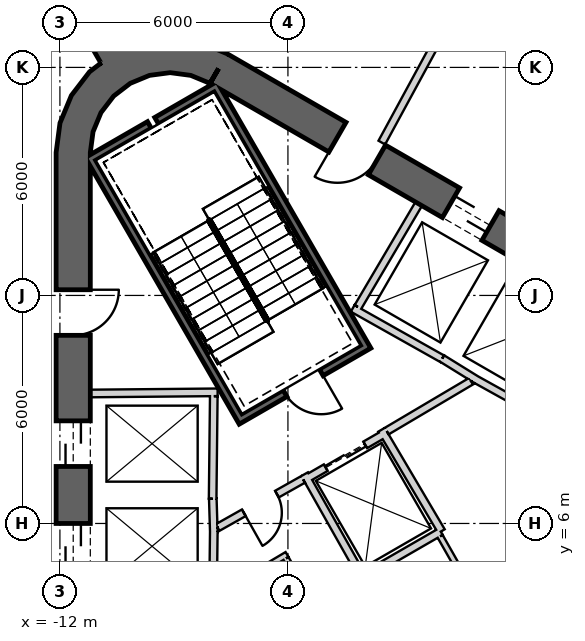
"""IFC4 building model, lengths in metres.
Left out: names, types, materials, properties, quantities, classifications, styles, units other than length and angle.
Written with IfcOpenShell. Run it as: python <this file> out.ifc"""

import sys

from ifc_helpers import new_model, si_unit, direction, frame, frame_2d, origin, place, context, subcontext, project, spatial, polyline, rectangle, outline, extrude, element, fill, save


model = new_model("IFC4")
c1 = context("Model", 3, precision=1e-05, world=origin(), true_north=direction((0.0, 1.0)))
c2 = subcontext(c1, "Body", "Model", "MODEL_VIEW")
j1 = project(units=[si_unit("LENGTHUNIT", "METRE"), si_unit("PLANEANGLEUNIT", "RADIAN")], contexts=[c1])
p1 = place(None, origin())
s1 = spatial("IfcSite", under=j1, at=p1, CompositionType="ELEMENT")
p2 = place(p1, origin())
s2 = spatial("IfcBuilding", under=s1, at=p2, CompositionType="ELEMENT")
p3 = place(p2, frame((0.0, 0.0, 156.2)))
s3 = spatial("IfcBuildingStorey", under=s2, at=p3, CompositionType="ELEMENT", Elevation=156.2)
p4 = place(p3, frame((19.475, 2.208, 0.0), z_axis=(0.0, 0.0, 1.0), x_axis=(-0.866028369851, 0.499994862586, 0.0)))
e1 = element("IfcWall", 1, at=p4, inside=s3, PredefinedType="SHEAR", context=c2, shape_type="SweptSolid", body=[
    extrude(rectangle(XDim=31.523, YDim=0.9, at=frame_2d((15.762, 0.0))), origin(), (0.0, 0.0, 1.0), 7.0),
])
p5 = place(p4, frame((7.062, 0.0, 0.0)))
e2 = element("IfcOpeningElement", 2, at=p5, cuts=e1, PredefinedType="OPENING", context=c2, shape_type="SweptSolid", body=[
    extrude(rectangle(XDim=1.2, YDim=2.4, at=frame_2d((0.6, 1.2))), frame((0.0, 0.46, 0.0), z_axis=(0.0, -1.0, 0.0), x_axis=(1.0, 0.0, 0.0)), (0.0, 0.0, 1.0), 0.92),
])
p6 = place(p4, frame((15.162, 0.0, 0.0)))
e3 = element("IfcOpeningElement", 3, at=p6, cuts=e1, PredefinedType="OPENING", context=c2, shape_type="SweptSolid", body=[
    extrude(rectangle(XDim=1.2, YDim=2.4, at=frame_2d((0.6, 1.2))), frame((0.0, 0.46, 0.0), z_axis=(0.0, -1.0, 0.0), x_axis=(1.0, 0.0, 0.0)), (0.0, 0.0, 1.0), 0.92),
])
p7 = place(p4, frame((17.862, 0.0, 0.0)))
e4 = element("IfcOpeningElement", 4, at=p7, cuts=e1, PredefinedType="OPENING", context=c2, shape_type="SweptSolid", body=[
    extrude(rectangle(XDim=1.2, YDim=2.4, at=frame_2d((0.6, 1.2))), frame((0.0, 0.46, 0.0), z_axis=(0.0, -1.0, 0.0), x_axis=(1.0, 0.0, 0.0)), (0.0, 0.0, 1.0), 0.92),
])
p8 = place(p4, frame((20.562, 0.0, 0.0)))
e5 = element("IfcOpeningElement", 5, at=p8, cuts=e1, PredefinedType="OPENING", context=c2, shape_type="SweptSolid", body=[
    extrude(rectangle(XDim=1.2, YDim=2.4, at=frame_2d((0.6, 1.2))), frame((0.0, 0.46, 0.0), z_axis=(0.0, -1.0, 0.0), x_axis=(1.0, 0.0, 0.0)), (0.0, 0.0, 1.0), 0.92),
])
p9 = place(p4, frame((23.262, 0.0, 0.0)))
e6 = element("IfcOpeningElement", 6, at=p9, cuts=e1, PredefinedType="OPENING", context=c2, shape_type="SweptSolid", body=[
    extrude(rectangle(XDim=1.2, YDim=2.4, at=frame_2d((0.6, 1.2))), frame((0.0, 0.46, 0.0), z_axis=(0.0, -1.0, 0.0), x_axis=(1.0, 0.0, 0.0)), (0.0, 0.0, 1.0), 0.92),
])
p10 = place(p4, frame((3.612, 0.0, 0.0)))
e7 = element("IfcOpeningElement", 7, at=p10, cuts=e1, PredefinedType="OPENING", context=c2, shape_type="SweptSolid", body=[
    extrude(rectangle(XDim=1.2, YDim=2.4, at=frame_2d((0.6, 1.2))), frame((0.0, 0.46, 0.0), z_axis=(0.0, -1.0, 0.0), x_axis=(1.0, 0.0, 0.0)), (0.0, 0.0, 1.0), 0.92),
])
p11 = place(p4, frame((26.712, 0.0, 0.0)))
e8 = element("IfcOpeningElement", 8, at=p11, cuts=e1, PredefinedType="OPENING", context=c2, shape_type="SweptSolid", body=[
    extrude(rectangle(XDim=1.2, YDim=2.4, at=frame_2d((0.6, 1.2))), frame((0.0, 0.46, 0.0), z_axis=(0.0, -1.0, 0.0), x_axis=(1.0, 0.0, 0.0)), (0.0, 0.0, 1.0), 0.92),
])
p12 = place(p3, frame((-11.65, 15.762, 0.0), z_axis=(0.0, 0.0, 1.0), x_axis=(0.0, -1.0, 0.0)))
e9 = element("IfcWall", 9, at=p12, inside=s3, PredefinedType="SHEAR", context=c2, shape_type="SweptSolid", body=[
    extrude(rectangle(XDim=31.523, YDim=0.9, at=frame_2d((15.762, 0.0))), origin(), (0.0, 0.0, 1.0), 7.0),
])
p13 = place(p12, frame((7.062, 0.0, 0.0)))
e10 = element("IfcOpeningElement", 10, at=p13, cuts=e9, PredefinedType="OPENING", context=c2, shape_type="SweptSolid", body=[
    extrude(rectangle(XDim=1.2, YDim=2.4, at=frame_2d((0.6, 1.2))), frame((0.0, 0.46, 0.0), z_axis=(0.0, -1.0, 0.0), x_axis=(1.0, 0.0, 0.0)), (0.0, 0.0, 1.0), 0.92),
])
p14 = place(p12, frame((9.762, 0.0, 0.0)))
e11 = element("IfcOpeningElement", 11, at=p14, cuts=e9, PredefinedType="OPENING", context=c2, shape_type="SweptSolid", body=[
    extrude(rectangle(XDim=1.2, YDim=2.4, at=frame_2d((0.6, 1.2))), frame((0.0, 0.46, 0.0), z_axis=(0.0, -1.0, 0.0), x_axis=(1.0, 0.0, 0.0)), (0.0, 0.0, 1.0), 0.92),
])
p15 = place(p12, frame((12.462, 0.0, 0.0)))
e12 = element("IfcOpeningElement", 12, at=p15, cuts=e9, PredefinedType="OPENING", context=c2, shape_type="SweptSolid", body=[
    extrude(rectangle(XDim=1.2, YDim=2.4, at=frame_2d((0.6, 1.2))), frame((0.0, 0.46, 0.0), z_axis=(0.0, -1.0, 0.0), x_axis=(1.0, 0.0, 0.0)), (0.0, 0.0, 1.0), 0.92),
])
p16 = place(p12, frame((15.162, 0.0, 0.0)))
e13 = element("IfcOpeningElement", 13, at=p16, cuts=e9, PredefinedType="OPENING", context=c2, shape_type="SweptSolid", body=[
    extrude(rectangle(XDim=1.2, YDim=2.4, at=frame_2d((0.6, 1.2))), frame((0.0, 0.46, 0.0), z_axis=(0.0, -1.0, 0.0), x_axis=(1.0, 0.0, 0.0)), (0.0, 0.0, 1.0), 0.92),
])
p17 = place(p12, frame((17.862, 0.0, 0.0)))
e14 = element("IfcOpeningElement", 14, at=p17, cuts=e9, PredefinedType="OPENING", context=c2, shape_type="SweptSolid", body=[
    extrude(rectangle(XDim=1.2, YDim=2.4, at=frame_2d((0.6, 1.2))), frame((0.0, 0.46, 0.0), z_axis=(0.0, -1.0, 0.0), x_axis=(1.0, 0.0, 0.0)), (0.0, 0.0, 1.0), 0.92),
])
p18 = place(p12, frame((20.562, 0.0, 0.0)))
e15 = element("IfcOpeningElement", 15, at=p18, cuts=e9, PredefinedType="OPENING", context=c2, shape_type="SweptSolid", body=[
    extrude(rectangle(XDim=1.2, YDim=2.4, at=frame_2d((0.6, 1.2))), frame((0.0, 0.46, 0.0), z_axis=(0.0, -1.0, 0.0), x_axis=(1.0, 0.0, 0.0)), (0.0, 0.0, 1.0), 0.92),
])
p19 = place(p12, frame((23.262, 0.0, 0.0)))
e16 = element("IfcOpeningElement", 16, at=p19, cuts=e9, PredefinedType="OPENING", context=c2, shape_type="SweptSolid", body=[
    extrude(rectangle(XDim=1.2, YDim=2.4, at=frame_2d((0.6, 1.2))), frame((0.0, 0.46, 0.0), z_axis=(0.0, -1.0, 0.0), x_axis=(1.0, 0.0, 0.0)), (0.0, 0.0, 1.0), 0.92),
])
p20 = place(p12, frame((3.612, 0.0, 0.0)))
e17 = element("IfcOpeningElement", 17, at=p20, cuts=e9, PredefinedType="OPENING", context=c2, shape_type="SweptSolid", body=[
    extrude(rectangle(XDim=1.2, YDim=2.4, at=frame_2d((0.6, 1.2))), frame((0.0, 0.46, 0.0), z_axis=(0.0, -1.0, 0.0), x_axis=(1.0, 0.0, 0.0)), (0.0, 0.0, 1.0), 0.92),
])
p21 = place(p12, frame((26.712, 0.0, 0.0)))
e18 = element("IfcOpeningElement", 18, at=p21, cuts=e9, PredefinedType="OPENING", context=c2, shape_type="SweptSolid", body=[
    extrude(rectangle(XDim=1.2, YDim=2.4, at=frame_2d((0.6, 1.2))), frame((0.0, 0.46, 0.0), z_axis=(0.0, -1.0, 0.0), x_axis=(1.0, 0.0, 0.0)), (0.0, 0.0, 1.0), 0.92),
])
p22 = place(p3, origin())
e19 = element("IfcWall", 19, at=p22, inside=s3, PredefinedType="SHEAR", context=c2, shape_type="SweptSolid", body=[
    extrude(outline(polyline([(-7.6, 18.36), (-8.323, 18.659), (-9.1, 18.762), (-9.876, 18.659), (-10.6, 18.36), (-11.221, 17.883), (-11.698, 17.262), (-11.998, 16.538), (-12.1, 15.762), (-11.2, 15.762), (-11.128, 16.305), (-10.919, 16.812), (-10.585, 17.247), (-10.15, 17.58), (-9.644, 17.79), (-9.1, 17.862), (-8.556, 17.79), (-8.05, 17.58), (-7.6, 18.36)])), origin(), (0.0, 0.0, 1.0), 7.0),
])
p23 = place(p3, frame((-10.575, 18.316, 0.0), z_axis=(0.0, 0.0, 1.0), x_axis=(-0.500002326941, 0.86602406032, 0.0)))
e20 = element("IfcWall", 20, at=p23, inside=s3, PredefinedType="SHEAR", context=c2, shape_type="SweptSolid", body=[
    extrude(rectangle(XDim=12.384, YDim=0.8, at=frame_2d((6.192, 0.0))), origin(), (0.0, 0.0, 1.0), 7.0),
])
p24 = place(p23, frame((2.05, 0.0, 0.0)))
e21 = element("IfcOpeningElement", 21, at=p24, cuts=e20, PredefinedType="OPENING", context=c2, shape_type="SweptSolid", body=[
    extrude(rectangle(XDim=1.4, YDim=2.4, at=frame_2d((0.7, 1.2))), frame((0.0, 0.41, 0.0), z_axis=(0.0, -1.0, 0.0), x_axis=(1.0, 0.0, 0.0)), (0.0, 0.0, 1.0), 0.82),
])
p25 = place(p3, frame((-11.2, 9.42, 0.0), z_axis=(0.0, 0.0, 1.0), x_axis=(0.999957167047, 0.009255488683, 0.0)))
e22 = element("IfcWall", 22, at=p25, inside=s3, PredefinedType="PLUMBINGWALL", context=c2, shape_type="SweptSolid", body=[
    extrude(rectangle(XDim=3.35, YDim=0.2, at=frame_2d((1.675, 0.0))), origin(), (0.0, 0.0, 1.0), 6.65),
])
p26 = place(p3, frame((-7.951, 9.35, 0.0), z_axis=(0.0, 0.0, 1.0), x_axis=(-0.011120469654, -0.999938165666, 0.0)))
e23 = element("IfcWall", 23, at=p26, inside=s3, PredefinedType="PLUMBINGWALL", context=c2, shape_type="SweptSolid", body=[
    extrude(rectangle(XDim=2.7, YDim=0.2, at=frame_2d((1.35, 0.0))), origin(), (0.0, 0.0, 1.0), 6.65),
])
p27 = place(p3, frame((-7.977, 6.65, 0.0), z_axis=(0.0, 0.0, 1.0), x_axis=(0.030861509705, -0.999523670164, 0.0)))
e24 = element("IfcWall", 24, at=p27, inside=s3, PredefinedType="PLUMBINGWALL", context=c2, shape_type="SweptSolid", body=[
    extrude(rectangle(XDim=0.878, YDim=0.2, at=frame_2d((0.439, 0.0))), origin(), (0.0, 0.0, 1.0), 6.65),
])
p28 = place(p3, frame((-7.949, 5.895, 0.0), z_axis=(0.0, 0.0, 1.0), x_axis=(-0.012042535896, -0.999927486035, 0.0)))
e25 = element("IfcWall", 25, at=p28, inside=s3, PredefinedType="PLUMBINGWALL", context=c2, shape_type="SweptSolid", body=[
    extrude(rectangle(XDim=1.845, YDim=0.2, at=frame_2d((0.922, 0.0))), origin(), (0.0, 0.0, 1.0), 6.65),
])
p29 = place(p3, frame((-1.941, 10.339, 0.0), z_axis=(0.0, 0.0, 1.0), x_axis=(0.850216889117, -0.526432561171, 0.0)))
e26 = element("IfcWall", 26, at=p29, inside=s3, PredefinedType="PLUMBINGWALL", context=c2, shape_type="SweptSolid", body=[
    extrude(rectangle(XDim=1.078, YDim=0.2, at=frame_2d((0.539, 0.0))), origin(), (0.0, 0.0, 1.0), 6.65),
])
p30 = place(p3, frame((0.483, 8.936, 0.0), z_axis=(0.0, 0.0, 1.0), x_axis=(-0.874269620932, 0.485440655401, 0.0)))
e27 = element("IfcWall", 27, at=p30, inside=s3, PredefinedType="PLUMBINGWALL", context=c2, shape_type="SweptSolid", body=[
    extrude(rectangle(XDim=1.845, YDim=0.2, at=frame_2d((0.922, 0.0))), origin(), (0.0, 0.0, 1.0), 6.65),
])
p31 = place(p3, frame((-4.296, 11.659, 0.0), z_axis=(0.0, 0.0, 1.0), x_axis=(0.871534483978, -0.490334215854, 0.0)))
e28 = element("IfcWall", 28, at=p31, inside=s3, PredefinedType="PLUMBINGWALL", context=c2, shape_type="SweptSolid", body=[
    extrude(rectangle(XDim=2.7, YDim=0.2, at=frame_2d((1.35, 0.0))), origin(), (0.0, 0.0, 1.0), 6.65),
])
p32 = place(p3, frame((-4.158, 11.696, 0.0), z_axis=(0.0, 0.0, 1.0), x_axis=(0.508018930956, 0.861345903683, 0.0)))
e29 = element("IfcWall", 29, at=p32, inside=s3, PredefinedType="PLUMBINGWALL", context=c2, shape_type="SweptSolid", body=[
    extrude(rectangle(XDim=3.15, YDim=0.2, at=frame_2d((1.575, 0.0))), origin(), (0.0, 0.0, 1.0), 6.65),
])
p33 = place(p3, frame((-11.245, 15.678, -0.35), z_axis=(0.0, 0.0, 1.0), x_axis=(0.499977274689, -0.866038523851, 0.0)))
e30 = element("IfcWall", 30, at=p33, inside=s3, PredefinedType="SHEAR", context=c2, shape_type="SweptSolid", body=[
    extrude(rectangle(XDim=8.1, YDim=0.2, at=frame_2d((4.05, 0.0))), origin(), (0.0, 0.0, 1.0), 7.0),
])
p34 = place(p3, frame((-7.818, 17.541, -0.35), z_axis=(0.0, 0.0, 1.0), x_axis=(-0.866088799389, -0.499890179513, 0.0)))
e31 = element("IfcWall", 31, at=p34, inside=s3, PredefinedType="SHEAR", context=c2, shape_type="SweptSolid", body=[
    extrude(rectangle(XDim=1.89, YDim=0.2, at=frame_2d((0.945, 0.0))), origin(), (0.0, 0.0, 1.0), 7.0),
])
p35 = place(p3, frame((-9.645, 16.486, -0.35), z_axis=(0.0, 0.0, 1.0), x_axis=(-0.866038843867, -0.499976720371, 0.0)))
e32 = element("IfcWall", 32, at=p35, inside=s3, PredefinedType="SHEAR", context=c2, shape_type="SweptSolid", body=[
    extrude(rectangle(XDim=1.69, YDim=0.2, at=frame_2d((0.845, 0.0))), origin(), (0.0, 0.0, 1.0), 7.0),
])
p36 = place(p3, frame((-7.854, 17.405, -0.35), z_axis=(0.0, 0.0, 1.0), x_axis=(0.499997992926, -0.866026562566, 0.0)))
e33 = element("IfcWall", 33, at=p36, inside=s3, PredefinedType="SHEAR", context=c2, shape_type="SweptSolid", body=[
    extrude(rectangle(XDim=7.9, YDim=0.2, at=frame_2d((3.95, 0.0))), origin(), (0.0, 0.0, 1.0), 7.0),
])
p37 = place(p3, frame((-7.159, 8.8, -0.35), z_axis=(0.0, 0.0, 1.0), x_axis=(0.866047807691, 0.499961193289, 0.0)))
e34 = element("IfcWall", 34, at=p37, inside=s3, PredefinedType="SHEAR", context=c2, shape_type="SweptSolid", body=[
    extrude(rectangle(XDim=3.6, YDim=0.2, at=frame_2d((1.8, 0.0))), origin(), (0.0, 0.0, 1.0), 7.0),
])
p38 = place(p37, frame((1.25, 0.0, 0.35)))
e35 = element("IfcOpeningElement", 35, at=p38, cuts=e34, PredefinedType="OPENING", context=c2, shape_type="SweptSolid", body=[
    extrude(rectangle(XDim=1.1, YDim=2.1, at=frame_2d((0.55, 1.05))), frame((0.0, 0.11, 0.0), z_axis=(0.0, -1.0, 0.0), x_axis=(1.0, 0.0, 0.0)), (0.0, 0.0, 1.0), 0.22),
])
p39 = place(p3, frame((-5.524, 7.168, 0.0), z_axis=(0.0, 0.0, 1.0), x_axis=(0.866024647952, 0.500001309137, 0.0)))
e36 = element("IfcWall", 36, at=p39, inside=s3, PredefinedType="PLUMBINGWALL", context=c2, shape_type="SweptSolid", body=[
    extrude(rectangle(XDim=2.4, YDim=0.2, at=frame_2d((1.2, 0.0))), origin(), (0.0, 0.0, 1.0), 6.65),
])
p40 = place(p39, frame((0.6, 0.0, 0.0)))
e37 = element("IfcOpeningElement", 37, at=p40, cuts=e36, PredefinedType="OPENING", context=c2, shape_type="SweptSolid", body=[
    extrude(rectangle(XDim=1.2, YDim=2.4, at=frame_2d((0.6, 1.2))), frame((0.0, 0.11, 0.0), z_axis=(0.0, -1.0, 0.0), x_axis=(1.0, 0.0, 0.0)), (0.0, 0.0, 1.0), 0.22),
])
p41 = place(p3, frame((-3.538, 8.465, 0.0), z_axis=(0.0, 0.0, 1.0), x_axis=(0.508647062354, -0.860975125052, 0.0)))
e38 = element("IfcWall", 38, at=p41, inside=s3, PredefinedType="PLUMBINGWALL", context=c2, shape_type="SweptSolid", body=[
    extrude(rectangle(XDim=3.1, YDim=0.2, at=frame_2d((1.55, 0.0))), origin(), (0.0, 0.0, 1.0), 6.65),
])
p42 = place(p3, frame((-1.979, 5.786, 0.0), z_axis=(0.0, 0.0, 1.0), x_axis=(-0.866016689309, -0.500015093611, 0.0)))
e39 = element("IfcWall", 39, at=p42, inside=s3, PredefinedType="PLUMBINGWALL", context=c2, shape_type="SweptSolid", body=[
    extrude(rectangle(XDim=2.479, YDim=0.2, at=frame_2d((1.24, 0.0))), origin(), (0.0, 0.0, 1.0), 6.65),
])
p43 = place(p3, frame((-5.562, 7.296, 0.0), z_axis=(0.0, 0.0, 1.0), x_axis=(0.49134651263, -0.870964180966, 0.0)))
e40 = element("IfcWall", 40, at=p43, inside=s3, PredefinedType="PLUMBINGWALL", context=c2, shape_type="SweptSolid", body=[
    extrude(rectangle(XDim=3.0, YDim=0.2, at=frame_2d((1.5, 0.0))), origin(), (0.0, 0.0, 1.0), 6.65),
])
p44 = place(p3, frame((-1.18, 9.744, 0.0), z_axis=(0.0, 0.0, 1.0), x_axis=(-0.860615607571, -0.509255118781, 0.0)))
e41 = element("IfcWall", 41, at=p44, inside=s3, PredefinedType="PARTITIONING", context=c2, shape_type="SweptSolid", body=[
    extrude(rectangle(XDim=2.581, YDim=0.2, at=frame_2d((1.29, 0.0))), origin(), (0.0, 0.0, 1.0), 6.65),
])
p45 = place(p3, frame((-5.6, 7.16, 0.0), z_axis=(0.0, 0.0, 1.0), x_axis=(-0.871363259478, -0.490638431059, 0.0)))
e42 = element("IfcWall", 42, at=p45, inside=s3, PredefinedType="PARTITIONING", context=c2, shape_type="SweptSolid", body=[
    extrude(rectangle(XDim=2.581, YDim=0.2, at=frame_2d((1.291, 0.0))), origin(), (0.0, 0.0, 1.0), 6.65),
])
p46 = place(p45, frame((0.791, 0.0, 0.0)))
e43 = element("IfcOpeningElement", 43, at=p46, cuts=e42, PredefinedType="OPENING", context=c2, shape_type="SweptSolid", body=[
    extrude(rectangle(XDim=1.0, YDim=2.1, at=frame_2d((0.5, 1.05))), frame((0.0, 0.11, 0.0), z_axis=(0.0, -1.0, 0.0), x_axis=(1.0, 0.0, 0.0)), (0.0, 0.0, 1.0), 0.22),
])
p47 = place(p3, frame((-1.994, 5.661, 0.0), z_axis=(0.0, 0.0, 1.0), x_axis=(0.494341211302, -0.869267948798, 0.0)))
e44 = element("IfcWall", 44, at=p47, inside=s3, PredefinedType="PLUMBINGWALL", context=c2, shape_type="SweptSolid", body=[
    extrude(rectangle(XDim=4.361, YDim=0.15, at=frame_2d((2.18, 0.0))), origin(), (0.0, 0.0, 1.0), 6.65),
])
p48 = place(p3, frame((-6.024, 5.183, 0.0), z_axis=(0.0, 0.0, 1.0), x_axis=(-0.860126804455, -0.510080268447, 0.0)))
e45 = element("IfcWall", 45, at=p48, inside=s3, PredefinedType="PLUMBINGWALL", context=c2, shape_type="SweptSolid", body=[
    extrude(rectangle(XDim=2.24, YDim=0.15, at=frame_2d((1.12, 0.0))), origin(), (0.0, 0.0, 1.0), 6.65),
])
p49 = place(p3, frame((-4.551, 2.482, 0.0), z_axis=(0.0, 0.0, 1.0), x_axis=(-0.499990139034, 0.866031096941, 0.0)))
e46 = element("IfcWall", 46, at=p49, inside=s3, PredefinedType="PLUMBINGWALL", context=c2, shape_type="SweptSolid", body=[
    extrude(rectangle(XDim=3.0, YDim=0.15, at=frame_2d((1.5, 0.0))), origin(), (0.0, 0.0, 1.0), 6.65),
])
p50 = place(p3, frame((2.86, 27.783, 0.0), z_axis=(0.0, 0.0, 1.0), x_axis=(-0.477390666412, -0.87869115827, 0.0)))
e47 = element("IfcWall", 47, at=p50, inside=s3, PredefinedType="PARTITIONING", context=c2, shape_type="SweptSolid", body=[
    extrude(rectangle(XDim=13.396, YDim=0.2, at=frame_2d((6.698, 0.0))), origin(), (0.0, 0.0, 1.0), 5.612),
])
p51 = place(p50, frame((6.2, 0.0, 0.0)))
e48 = element("IfcOpeningElement", 48, at=p51, cuts=e47, PredefinedType="OPENING", context=c2, shape_type="SweptSolid", body=[
    extrude(rectangle(XDim=1.0, YDim=2.1, at=frame_2d((0.5, 1.05))), frame((0.0, 0.11, 0.0), z_axis=(0.0, -1.0, 0.0), x_axis=(1.0, 0.0, 0.0)), (0.0, 0.0, 1.0), 0.22),
])
p52 = place(p38, origin())
e49 = element("IfcDoor", 49, at=p52, inside=s3, OperationType="SINGLE_SWING_RIGHT", PredefinedType="USERDEFINED", context=c2, shape_type="SweptSolid", body=[
    extrude(rectangle(XDim=1.1, YDim=2.1, at=frame_2d((0.55, 1.05))), frame((0.0, 0.025, 0.0), z_axis=(0.0, -1.0, 0.0), x_axis=(1.0, 0.0, 0.0)), (0.0, 0.0, 1.0), 0.05),
])
fill(e35, e49)
p53 = place(p46, origin())
e50 = element("IfcDoor", 50, at=p53, inside=s3, OperationType="SINGLE_SWING_RIGHT", PredefinedType="USERDEFINED", context=c2, shape_type="SweptSolid", body=[
    extrude(rectangle(XDim=1.0, YDim=2.1, at=frame_2d((0.5, 1.05))), frame((0.0, 0.025, 0.0), z_axis=(0.0, -1.0, 0.0), x_axis=(1.0, 0.0, 0.0)), (0.0, 0.0, 1.0), 0.05),
])
fill(e43, e50)
p54 = place(p40, origin())
e51 = element("IfcDoor", 51, at=p54, inside=s3, OperationType="SLIDING_TO_LEFT", PredefinedType="USERDEFINED", context=c2, shape_type="SweptSolid", body=[
    extrude(rectangle(XDim=1.2, YDim=2.4, at=frame_2d((0.6, 1.2))), frame((0.0, 0.025, 0.0), z_axis=(0.0, -1.0, 0.0), x_axis=(1.0, 0.0, 0.0)), (0.0, 0.0, 1.0), 0.05),
])
fill(e37, e51)
p55 = place(p13, origin())
e52 = element("IfcDoor", 52, at=p55, inside=s3, OperationType="SLIDING_TO_LEFT", PredefinedType="USERDEFINED", context=c2, shape_type="SweptSolid", body=[
    extrude(rectangle(XDim=1.2, YDim=2.4, at=frame_2d((0.6, 1.2))), frame((0.0, 0.025, 0.0), z_axis=(0.0, -1.0, 0.0), x_axis=(1.0, 0.0, 0.0)), (0.0, 0.0, 1.0), 0.05),
])
fill(e10, e52)
p56 = place(p14, origin())
e53 = element("IfcDoor", 53, at=p56, inside=s3, OperationType="SLIDING_TO_LEFT", PredefinedType="USERDEFINED", context=c2, shape_type="SweptSolid", body=[
    extrude(rectangle(XDim=1.2, YDim=2.4, at=frame_2d((0.6, 1.2))), frame((0.0, 0.025, 0.0), z_axis=(0.0, -1.0, 0.0), x_axis=(1.0, 0.0, 0.0)), (0.0, 0.0, 1.0), 0.05),
])
fill(e11, e53)
p57 = place(p9, origin())
e54 = element("IfcDoor", 54, at=p57, inside=s3, OperationType="SLIDING_TO_LEFT", PredefinedType="USERDEFINED", context=c2, shape_type="SweptSolid", body=[
    extrude(rectangle(XDim=1.2, YDim=2.4, at=frame_2d((0.6, 1.2))), frame((0.0, 0.025, 0.0), z_axis=(0.0, -1.0, 0.0), x_axis=(1.0, 0.0, 0.0)), (0.0, 0.0, 1.0), 0.05),
])
fill(e6, e54)
p58 = place(p11, origin())
e55 = element("IfcDoor", 55, at=p58, inside=s3, OperationType="SINGLE_SWING_RIGHT", PredefinedType="USERDEFINED", context=c2, shape_type="SweptSolid", body=[
    extrude(rectangle(XDim=1.2, YDim=2.4, at=frame_2d((0.6, 1.2))), frame((0.0, 0.025, 0.0), z_axis=(0.0, -1.0, 0.0), x_axis=(1.0, 0.0, 0.0)), (0.0, 0.0, 1.0), 0.05),
])
fill(e8, e55)
p59 = place(p20, origin())
e56 = element("IfcDoor", 56, at=p59, inside=s3, OperationType="SINGLE_SWING_LEFT", PredefinedType="USERDEFINED", context=c2, shape_type="SweptSolid", body=[
    extrude(rectangle(XDim=1.2, YDim=2.4, at=frame_2d((0.6, 1.2))), frame((0.0, 0.025, 0.0), z_axis=(0.0, -1.0, 0.0), x_axis=(1.0, 0.0, 0.0)), (0.0, 0.0, 1.0), 0.05),
])
fill(e17, e56)
save(model, sys.argv[1])
